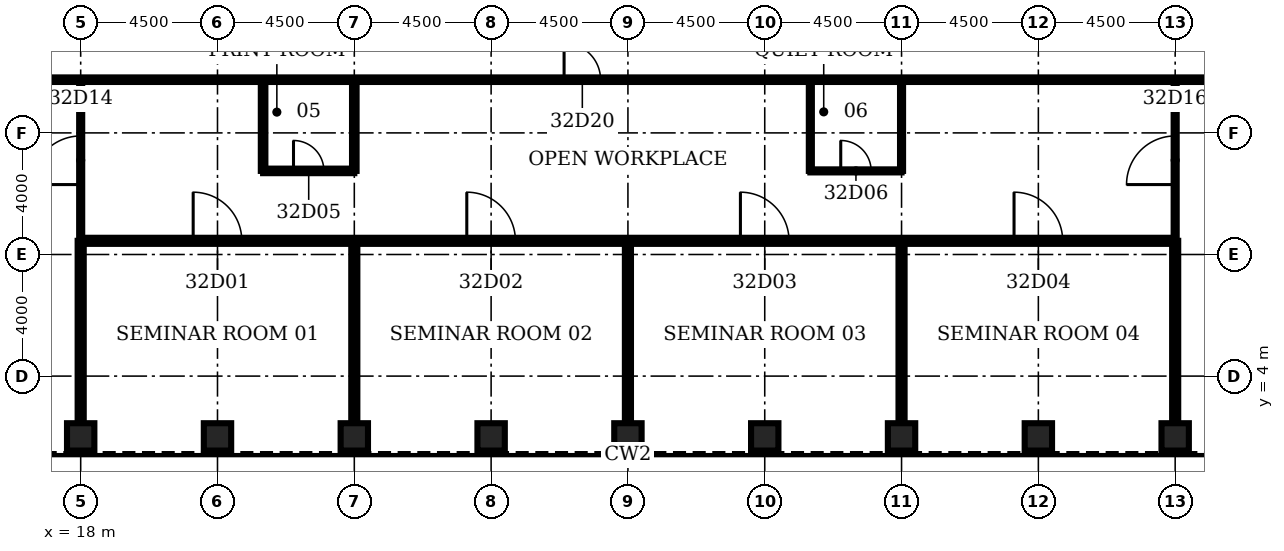
"""IFC4 building model, lengths in metres.
Left out: names, types, materials, properties, quantities, classifications, styles, units other than length and angle.
Written with IfcOpenShell. Run it as: python <this file> out.ifc"""

import sys

from ifc_helpers import new_model, si_unit, direction, frame, frame_2d, origin, origin_2d, place, context, subcontext, project, spatial, rectangle, hollow_rectangle, extrude, element, fill, save


model = new_model("IFC4")
c1 = context("Model", 3, precision=1e-05, world=origin(), true_north=direction((0.0, 1.0)))
c2 = subcontext(c1, "Body", "Model", "MODEL_VIEW")
j1 = project(units=[si_unit("LENGTHUNIT", "METRE"), si_unit("PLANEANGLEUNIT", "RADIAN")], contexts=[c1])
p1 = place(None, origin())
s1 = spatial("IfcSite", under=j1, at=p1, CompositionType="ELEMENT")
p2 = place(p1, origin())
s2 = spatial("IfcBuilding", under=s1, at=p2, CompositionType="ELEMENT")
p3 = place(p2, frame((0.0, 0.0, 146.7)))
s3 = spatial("IfcBuildingStorey", under=s2, at=p3, CompositionType="ELEMENT", Elevation=146.7)
for number, where, z_axis, x_axis in (
    (1, (18.0, 2.0, 0.0), (0.0, 0.0, 1.0), (0.0, 1.0, 0.0)),
    (2, (22.5, 2.0, 0.0), (0.0, 0.0, 1.0), (0.0, 1.0, 0.0)),
    (3, (27.0, 2.0, 0.0), (0.0, 0.0, 1.0), (0.0, 1.0, 0.0)),
    (4, (31.5, 2.0, 0.0), (0.0, 0.0, 1.0), (0.0, 1.0, 0.0)),
    (5, (36.0, 2.0, 0.0), (0.0, 0.0, 1.0), (0.0, 1.0, 0.0)),
    (6, (40.5, 2.0, 0.0), (0.0, 0.0, 1.0), (0.0, 1.0, 0.0)),
    (7, (45.0, 2.0, 0.0), (0.0, 0.0, 1.0), (0.0, 1.0, 0.0)),
    (8, (49.5, 2.0, 0.0), (0.0, 0.0, 1.0), (0.0, 1.0, 0.0)),
    (9, (54.0, 2.0, 0.0), (0.0, 0.0, 1.0), (0.0, 1.0, 0.0)),
):
    element("IfcColumn", number, at=place(p3, frame(where, z_axis=z_axis, x_axis=x_axis)), inside=s3, PredefinedType="COLUMN", context=c2, shape_type="SweptSolid", body=[
        extrude(hollow_rectangle(XDim=0.9, YDim=0.9, WallThickness=0.1, at=origin_2d()), origin(), (0.0, 0.0, 1.0), 4.2),
    ])
p4 = place(p3, frame((18.0, 8.45, 0.0), z_axis=(0.0, 0.0, 1.0), x_axis=(1.0, 0.0, 0.0)))
e10 = element("IfcWall", 10, at=p4, inside=s3, PredefinedType="PARTITIONING", context=c2, shape_type="SweptSolid", body=[
    extrude(rectangle(XDim=36.0, YDim=0.2, at=frame_2d((18.0, 0.0))), origin(), (0.0, 0.0, 1.0), 3.0),
])
p5 = place(p4, frame((3.7, 0.0, 0.0)))
e11 = element("IfcOpeningElement", 11, at=p5, cuts=e10, PredefinedType="OPENING", context=c2, shape_type="SweptSolid", body=[
    extrude(rectangle(XDim=1.6, YDim=2.1, at=frame_2d((0.8, 1.05))), frame((0.0, 0.11, 0.0), z_axis=(0.0, -1.0, 0.0), x_axis=(1.0, 0.0, 0.0)), (0.0, 0.0, 1.0), 0.22),
])
p6 = place(p4, frame((12.7, 0.0, 0.0)))
e12 = element("IfcOpeningElement", 12, at=p6, cuts=e10, PredefinedType="OPENING", context=c2, shape_type="SweptSolid", body=[
    extrude(rectangle(XDim=1.6, YDim=2.1, at=frame_2d((0.8, 1.05))), frame((0.0, 0.11, 0.0), z_axis=(0.0, -1.0, 0.0), x_axis=(1.0, 0.0, 0.0)), (0.0, 0.0, 1.0), 0.22),
])
p7 = place(p4, frame((21.7, 0.0, 0.0)))
e13 = element("IfcOpeningElement", 13, at=p7, cuts=e10, PredefinedType="OPENING", context=c2, shape_type="SweptSolid", body=[
    extrude(rectangle(XDim=1.6, YDim=2.1, at=frame_2d((0.8, 1.05))), frame((0.0, 0.11, 0.0), z_axis=(0.0, -1.0, 0.0), x_axis=(1.0, 0.0, 0.0)), (0.0, 0.0, 1.0), 0.22),
])
p8 = place(p4, frame((30.7, 0.0, 0.0)))
e14 = element("IfcOpeningElement", 14, at=p8, cuts=e10, PredefinedType="OPENING", context=c2, shape_type="SweptSolid", body=[
    extrude(rectangle(XDim=1.6, YDim=2.1, at=frame_2d((0.8, 1.05))), frame((0.0, 0.11, 0.0), z_axis=(0.0, -1.0, 0.0), x_axis=(1.0, 0.0, 0.0)), (0.0, 0.0, 1.0), 0.22),
])
p9 = place(p3, frame((24.0, 10.75, 0.0), z_axis=(0.0, 0.0, 1.0), x_axis=(1.0, 0.0, 0.0)))
e15 = element("IfcWall", 15, at=p9, inside=s3, PredefinedType="PARTITIONING", context=c2, shape_type="SweptSolid", body=[
    extrude(rectangle(XDim=3.0, YDim=0.15, at=frame_2d((1.5, 0.0))), origin(), (0.0, 0.0, 1.0), 3.0),
])
p10 = place(p9, frame((1.0, 0.0, 0.0)))
e16 = element("IfcOpeningElement", 16, at=p10, cuts=e15, PredefinedType="OPENING", context=c2, shape_type="SweptSolid", body=[
    extrude(rectangle(XDim=1.0, YDim=2.1, at=frame_2d((0.5, 1.05))), frame((0.0, 0.085, 0.0), z_axis=(0.0, -1.0, 0.0), x_axis=(1.0, 0.0, 0.0)), (0.0, 0.0, 1.0), 0.17),
])
p11 = place(p3, frame((42.0, 10.75, 0.0), z_axis=(0.0, 0.0, 1.0), x_axis=(1.0, 0.0, 0.0)))
e17 = element("IfcWall", 17, at=p11, inside=s3, PredefinedType="PARTITIONING", context=c2, shape_type="SweptSolid", body=[
    extrude(rectangle(XDim=3.0, YDim=0.1, at=frame_2d((1.5, 0.0))), origin(), (0.0, 0.0, 1.0), 3.0),
])
p12 = place(p11, frame((1.0, 0.0, 0.0)))
e18 = element("IfcOpeningElement", 18, at=p12, cuts=e17, PredefinedType="OPENING", context=c2, shape_type="SweptSolid", body=[
    extrude(rectangle(XDim=1.0, YDim=2.1, at=frame_2d((0.5, 1.05))), frame((0.0, 0.06, 0.0), z_axis=(0.0, -1.0, 0.0), x_axis=(1.0, 0.0, 0.0)), (0.0, 0.0, 1.0), 0.12),
])
p13 = place(p3, frame((15.15, 13.75, 0.0), z_axis=(0.0, 0.0, 1.0), x_axis=(1.0, 0.0, 0.0)))
e19 = element("IfcWall", 19, at=p13, inside=s3, PredefinedType="PARTITIONING", context=c2, shape_type="SweptSolid", body=[
    extrude(rectangle(XDim=41.7, YDim=0.15, at=frame_2d((20.85, 0.0))), origin(), (0.0, 0.0, 1.0), 3.0),
])
p14 = place(p13, frame((18.75, 0.0, 0.0)))
e20 = element("IfcOpeningElement", 20, at=p14, cuts=e19, PredefinedType="OPENING", context=c2, shape_type="SweptSolid", body=[
    extrude(rectangle(XDim=1.2, YDim=2.1, at=frame_2d((0.6, 1.05))), frame((0.0, 0.085, 0.0), z_axis=(0.0, -1.0, 0.0), x_axis=(1.0, 0.0, 0.0)), (0.0, 0.0, 1.0), 0.17),
])
p15 = place(p3, frame((18.0, 2.45, 0.0), z_axis=(0.0, 0.0, 1.0), x_axis=(0.0, 1.0, 0.0)))
e21 = element("IfcWall", 21, at=p15, inside=s3, PredefinedType="PARTITIONING", context=c2, shape_type="SweptSolid", body=[
    extrude(rectangle(XDim=6.0, YDim=0.2, at=frame_2d((3.0, 0.0))), origin(), (0.0, 0.0, 1.0), 3.0),
])
p16 = place(p3, frame((18.0, 8.45, 0.0), z_axis=(0.0, 0.0, 1.0), x_axis=(0.0, 1.0, 0.0)))
e22 = element("IfcWall", 22, at=p16, inside=s3, PredefinedType="PARTITIONING", context=c2, shape_type="SweptSolid", body=[
    extrude(rectangle(XDim=5.3, YDim=0.1, at=frame_2d((2.65, 0.0))), origin(), (0.0, 0.0, 1.0), 3.0),
])
p17 = place(p16, frame((1.85, 0.0, 0.0)))
e23 = element("IfcOpeningElement", 23, at=p17, cuts=e22, PredefinedType="OPENING", context=c2, shape_type="SweptSolid", body=[
    extrude(rectangle(XDim=1.6, YDim=2.1, at=frame_2d((0.8, 1.05))), frame((0.0, 0.06, 0.0), z_axis=(0.0, -1.0, 0.0), x_axis=(1.0, 0.0, 0.0)), (0.0, 0.0, 1.0), 0.12),
])
p18 = place(p3, frame((24.0, 10.75, 0.0), z_axis=(0.0, 0.0, 1.0), x_axis=(0.0, 1.0, 0.0)))
e24 = element("IfcWall", 24, at=p18, inside=s3, PredefinedType="PARTITIONING", context=c2, shape_type="SweptSolid", body=[
    extrude(rectangle(XDim=3.0, YDim=0.15, at=frame_2d((1.5, 0.0))), origin(), (0.0, 0.0, 1.0), 3.0),
])
p19 = place(p3, frame((27.0, 2.45, 0.0), z_axis=(0.0, 0.0, 1.0), x_axis=(0.0, 1.0, 0.0)))
e25 = element("IfcWall", 25, at=p19, inside=s3, PredefinedType="PARTITIONING", context=c2, shape_type="SweptSolid", body=[
    extrude(rectangle(XDim=6.0, YDim=0.2, at=frame_2d((3.0, 0.0))), origin(), (0.0, 0.0, 1.0), 3.0),
])
p20 = place(p3, frame((27.0, 10.75, 0.0), z_axis=(0.0, 0.0, 1.0), x_axis=(0.0, 1.0, 0.0)))
e26 = element("IfcWall", 26, at=p20, inside=s3, PredefinedType="PARTITIONING", context=c2, shape_type="SweptSolid", body=[
    extrude(rectangle(XDim=3.0, YDim=0.15, at=frame_2d((1.5, 0.0))), origin(), (0.0, 0.0, 1.0), 3.0),
])
p21 = place(p3, frame((36.0, 2.45, 0.0), z_axis=(0.0, 0.0, 1.0), x_axis=(0.0, 1.0, 0.0)))
e27 = element("IfcWall", 27, at=p21, inside=s3, PredefinedType="PARTITIONING", context=c2, shape_type="SweptSolid", body=[
    extrude(rectangle(XDim=6.0, YDim=0.2, at=frame_2d((3.0, 0.0))), origin(), (0.0, 0.0, 1.0), 3.0),
])
p22 = place(p3, frame((42.0, 10.75, 0.0), z_axis=(0.0, 0.0, 1.0), x_axis=(0.0, 1.0, 0.0)))
e28 = element("IfcWall", 28, at=p22, inside=s3, PredefinedType="PARTITIONING", context=c2, shape_type="SweptSolid", body=[
    extrude(rectangle(XDim=3.0, YDim=0.1, at=frame_2d((1.5, 0.0))), origin(), (0.0, 0.0, 1.0), 3.0),
])
p23 = place(p3, frame((45.0, 2.45, 0.0), z_axis=(0.0, 0.0, 1.0), x_axis=(0.0, 1.0, 0.0)))
e29 = element("IfcWall", 29, at=p23, inside=s3, PredefinedType="PARTITIONING", context=c2, shape_type="SweptSolid", body=[
    extrude(rectangle(XDim=6.0, YDim=0.2, at=frame_2d((3.0, 0.0))), origin(), (0.0, 0.0, 1.0), 3.0),
])
p24 = place(p3, frame((45.0, 10.75, 0.0), z_axis=(0.0, 0.0, 1.0), x_axis=(0.0, 1.0, 0.0)))
e30 = element("IfcWall", 30, at=p24, inside=s3, PredefinedType="PARTITIONING", context=c2, shape_type="SweptSolid", body=[
    extrude(rectangle(XDim=3.0, YDim=0.1, at=frame_2d((1.5, 0.0))), origin(), (0.0, 0.0, 1.0), 3.0),
])
p25 = place(p3, frame((54.0, 2.45, 0.0), z_axis=(0.0, 0.0, 1.0), x_axis=(0.0, 1.0, 0.0)))
e31 = element("IfcWall", 31, at=p25, inside=s3, PredefinedType="PARTITIONING", context=c2, shape_type="SweptSolid", body=[
    extrude(rectangle(XDim=6.0, YDim=0.2, at=frame_2d((3.0, 0.0))), origin(), (0.0, 0.0, 1.0), 3.0),
])
p26 = place(p3, frame((54.0, 8.45, 0.0), z_axis=(0.0, 0.0, 1.0), x_axis=(0.0, 1.0, 0.0)))
e32 = element("IfcWall", 32, at=p26, inside=s3, PredefinedType="PARTITIONING", context=c2, shape_type="SweptSolid", body=[
    extrude(rectangle(XDim=5.3, YDim=0.1, at=frame_2d((2.65, 0.0))), origin(), (0.0, 0.0, 1.0), 3.0),
])
p27 = place(p26, frame((1.85, 0.0, 0.0)))
e33 = element("IfcOpeningElement", 33, at=p27, cuts=e32, PredefinedType="OPENING", context=c2, shape_type="SweptSolid", body=[
    extrude(rectangle(XDim=1.6, YDim=2.1, at=frame_2d((0.8, 1.05))), frame((0.0, 0.06, 0.0), z_axis=(0.0, -1.0, 0.0), x_axis=(1.0, 0.0, 0.0)), (0.0, 0.0, 1.0), 0.12),
])
p28 = place(p5, origin())
e34 = element("IfcDoor", 34, at=p28, inside=s3, OperationType="SINGLE_SWING_LEFT", PredefinedType="DOOR", context=c2, shape_type="SweptSolid", body=[
    extrude(rectangle(XDim=1.6, YDim=2.1, at=frame_2d((0.8, 1.05))), frame((0.0, 0.025, 0.0), z_axis=(0.0, -1.0, 0.0), x_axis=(1.0, 0.0, 0.0)), (0.0, 0.0, 1.0), 0.05),
])
fill(e11, e34)
p29 = place(p6, origin())
e35 = element("IfcDoor", 35, at=p29, inside=s3, OperationType="SINGLE_SWING_LEFT", PredefinedType="DOOR", context=c2, shape_type="SweptSolid", body=[
    extrude(rectangle(XDim=1.6, YDim=2.1, at=frame_2d((0.8, 1.05))), frame((0.0, 0.025, 0.0), z_axis=(0.0, -1.0, 0.0), x_axis=(1.0, 0.0, 0.0)), (0.0, 0.0, 1.0), 0.05),
])
fill(e12, e35)
p30 = place(p7, origin())
e36 = element("IfcDoor", 36, at=p30, inside=s3, OperationType="SINGLE_SWING_LEFT", PredefinedType="DOOR", context=c2, shape_type="SweptSolid", body=[
    extrude(rectangle(XDim=1.6, YDim=2.1, at=frame_2d((0.8, 1.05))), frame((0.0, 0.025, 0.0), z_axis=(0.0, -1.0, 0.0), x_axis=(1.0, 0.0, 0.0)), (0.0, 0.0, 1.0), 0.05),
])
fill(e13, e36)
p31 = place(p8, origin())
e37 = element("IfcDoor", 37, at=p31, inside=s3, OperationType="SINGLE_SWING_LEFT", PredefinedType="DOOR", context=c2, shape_type="SweptSolid", body=[
    extrude(rectangle(XDim=1.6, YDim=2.1, at=frame_2d((0.8, 1.05))), frame((0.0, 0.025, 0.0), z_axis=(0.0, -1.0, 0.0), x_axis=(1.0, 0.0, 0.0)), (0.0, 0.0, 1.0), 0.05),
])
fill(e14, e37)
p32 = place(p10, origin())
e38 = element("IfcDoor", 38, at=p32, inside=s3, OperationType="SINGLE_SWING_LEFT", PredefinedType="DOOR", context=c2, shape_type="SweptSolid", body=[
    extrude(rectangle(XDim=1.0, YDim=2.1, at=frame_2d((0.5, 1.05))), frame((0.0, 0.025, 0.0), z_axis=(0.0, -1.0, 0.0), x_axis=(1.0, 0.0, 0.0)), (0.0, 0.0, 1.0), 0.05),
])
fill(e16, e38)
p33 = place(p12, origin())
e39 = element("IfcDoor", 39, at=p33, inside=s3, OperationType="SINGLE_SWING_LEFT", PredefinedType="DOOR", context=c2, shape_type="SweptSolid", body=[
    extrude(rectangle(XDim=1.0, YDim=2.1, at=frame_2d((0.5, 1.05))), frame((0.0, 0.025, 0.0), z_axis=(0.0, -1.0, 0.0), x_axis=(1.0, 0.0, 0.0)), (0.0, 0.0, 1.0), 0.05),
])
fill(e18, e39)
p34 = place(p17, origin())
e40 = element("IfcDoor", 40, at=p34, inside=s3, OperationType="SINGLE_SWING_LEFT", PredefinedType="DOOR", context=c2, shape_type="SweptSolid", body=[
    extrude(rectangle(XDim=1.6, YDim=2.1, at=frame_2d((0.8, 1.05))), frame((0.0, 0.025, 0.0), z_axis=(0.0, -1.0, 0.0), x_axis=(1.0, 0.0, 0.0)), (0.0, 0.0, 1.0), 0.05),
])
fill(e23, e40)
p35 = place(p27, origin())
e41 = element("IfcDoor", 41, at=p35, inside=s3, OperationType="SINGLE_SWING_LEFT", PredefinedType="DOOR", context=c2, shape_type="SweptSolid", body=[
    extrude(rectangle(XDim=1.6, YDim=2.1, at=frame_2d((0.8, 1.05))), frame((0.0, 0.025, 0.0), z_axis=(0.0, -1.0, 0.0), x_axis=(1.0, 0.0, 0.0)), (0.0, 0.0, 1.0), 0.05),
])
fill(e33, e41)
p36 = place(p14, origin())
e42 = element("IfcDoor", 42, at=p36, inside=s3, OperationType="SINGLE_SWING_LEFT", PredefinedType="DOOR", context=c2, shape_type="SweptSolid", body=[
    extrude(rectangle(XDim=1.2, YDim=2.1, at=frame_2d((0.6, 1.05))), frame((0.0, 0.025, 0.0), z_axis=(0.0, -1.0, 0.0), x_axis=(1.0, 0.0, 0.0)), (0.0, 0.0, 1.0), 0.05),
])
fill(e20, e42)
save(model, sys.argv[1])
